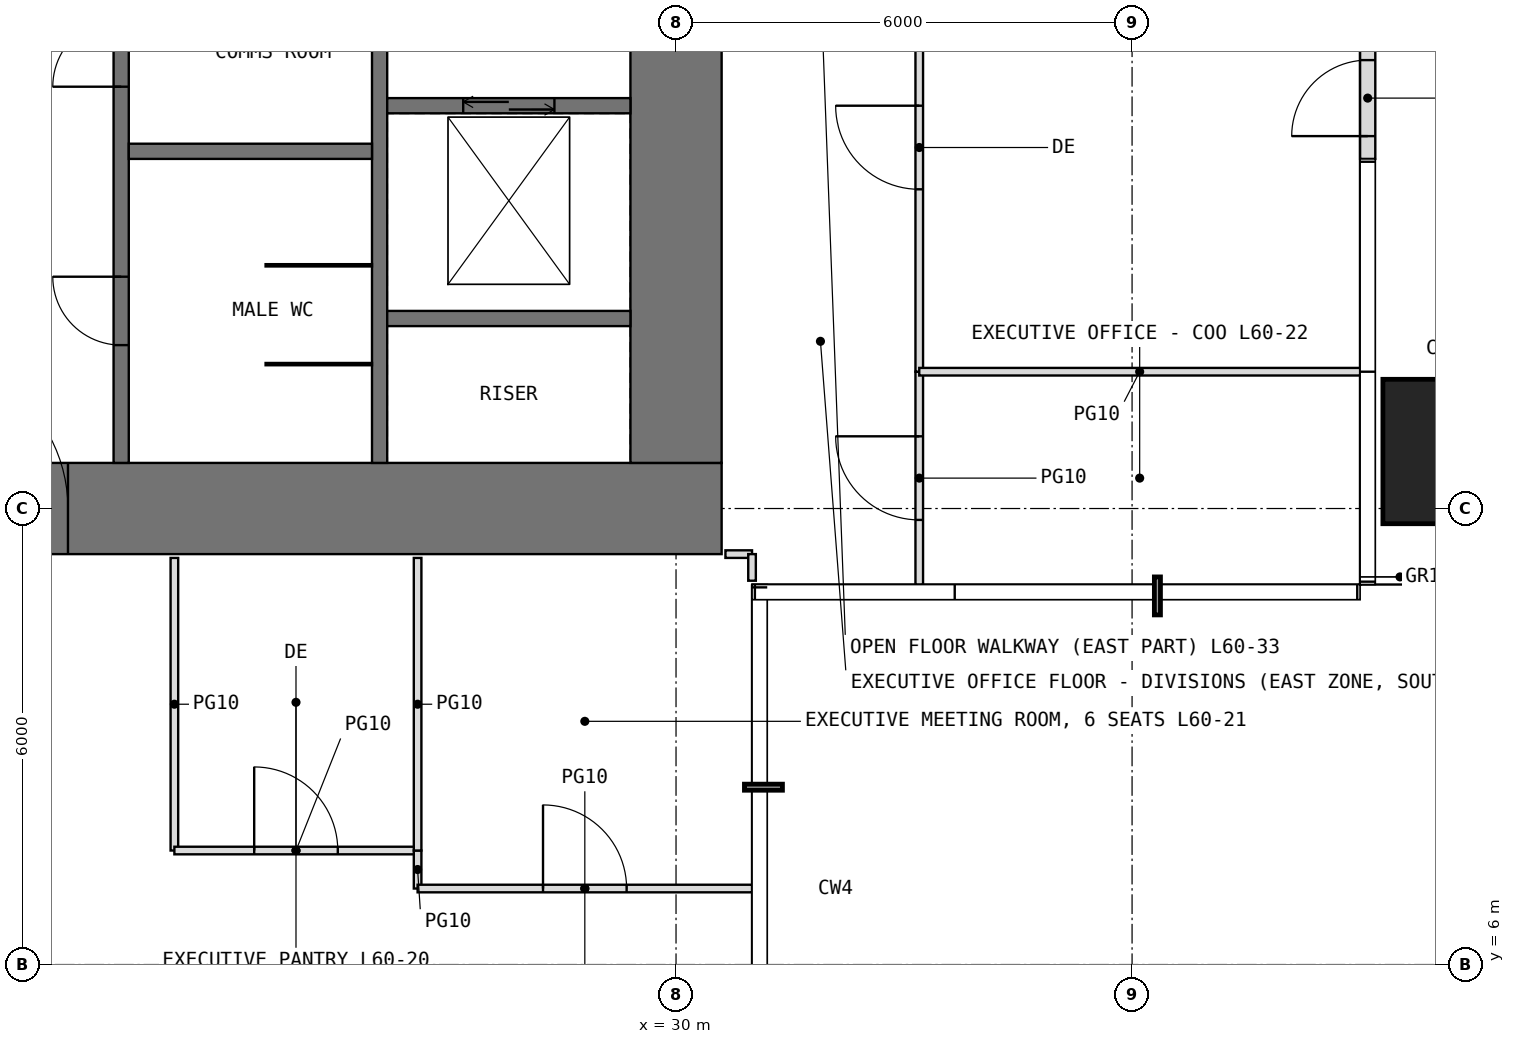
"""IFC4 building model, lengths in metres.
Left out: names, types, materials, properties, quantities, classifications, styles, units other than length and angle.
Written with IfcOpenShell. Run it as: python <this file> out.ifc"""

import sys

from ifc_helpers import new_model, si_unit, direction, frame, frame_2d, origin, origin_2d, place, context, subcontext, project, spatial, rectangle, extrude, element, fill, save


model = new_model("IFC4")
c1 = context("Model", 3, precision=1e-05, world=origin(), true_north=direction((0.0, 1.0)))
c2 = subcontext(c1, "Body", "Model", "MODEL_VIEW")
j1 = project(units=[si_unit("LENGTHUNIT", "METRE"), si_unit("PLANEANGLEUNIT", "RADIAN")], contexts=[c1])
p1 = place(None, origin())
s1 = spatial("IfcSite", under=j1, at=p1, CompositionType="ELEMENT")
p2 = place(p1, origin())
s2 = spatial("IfcBuilding", under=s1, at=p2, CompositionType="ELEMENT")
p3 = place(p2, frame((0.0, 0.0, 252.4)))
s3 = spatial("IfcBuildingStorey", under=s2, at=p3, CompositionType="ELEMENT", Elevation=252.4)
p4 = place(p3, frame((40.25, 12.75, 0.0), z_axis=(0.0, 0.0, 1.0), x_axis=(1.0, 0.0, 0.0)))
e1 = element("IfcColumn", 1, at=p4, inside=s3, PredefinedType="COLUMN", context=c2, shape_type="SweptSolid", body=[
    extrude(rectangle(XDim=1.9, YDim=1.9, at=origin_2d()), origin(), (0.0, 0.0, 1.0), 4.2),
])
p5 = place(p3, frame((39.1, 16.6, 0.0), z_axis=(0.0, 0.0, 1.0), x_axis=(0.0, 1.0, 0.0)))
e2 = element("IfcWall", 2, at=p5, inside=s3, PredefinedType="USERDEFINED", context=c2, shape_type="SweptSolid", body=[
    extrude(rectangle(XDim=4.05, YDim=0.2, at=frame_2d((2.025, 0.0))), origin(), (0.0, 0.0, 1.0), 3.95),
])
p6 = place(p5, frame((0.3, 0.0, 0.0)))
e3 = element("IfcOpeningElement", 3, at=p6, cuts=e2, PredefinedType="OPENING", context=c2, shape_type="SweptSolid", body=[
    extrude(rectangle(XDim=1.0, YDim=2.4, at=frame_2d((0.5, 1.2))), frame((0.0, 0.11, 0.0), z_axis=(0.0, -1.0, 0.0), x_axis=(1.0, 0.0, 0.0)), (0.0, 0.0, 1.0), 0.22),
])
p7 = place(p5, frame((1.6, 0.0, 0.3)))
e4 = element("IfcOpeningElement", 4, at=p7, cuts=e2, PredefinedType="OPENING", context=c2, shape_type="SweptSolid", body=[
    extrude(rectangle(XDim=2.0, YDim=2.7, at=frame_2d((1.0, 1.35))), frame((0.0, 0.11, 0.0), z_axis=(0.0, -1.0, 0.0), x_axis=(1.0, 0.0, 0.0)), (0.0, 0.0, 1.0), 0.22),
])
p8 = place(p3, frame((11.4, 12.0, -0.05), z_axis=(0.0, 0.0, 1.0), x_axis=(1.0, 0.0, 0.0)))
e5 = element("IfcWall", 5, at=p8, inside=s3, PredefinedType="SHEAR", context=c2, shape_type="SweptSolid", body=[
    extrude(rectangle(XDim=19.2, YDim=1.2, at=frame_2d((9.6, 0.0))), origin(), (0.0, 0.0, 1.0), 4.2),
])
p9 = place(p8, frame((8.6, 0.0, 0.05)))
e6 = element("IfcOpeningElement", 6, at=p9, cuts=e5, PredefinedType="OPENING", context=c2, shape_type="SweptSolid", body=[
    extrude(rectangle(XDim=2.0, YDim=2.2, at=frame_2d((1.0, 1.1))), frame((0.0, 0.61, 0.0), z_axis=(0.0, -1.0, 0.0), x_axis=(1.0, 0.0, 0.0)), (0.0, 0.0, 1.0), 1.22),
])
p10 = place(p3, frame((30.0, 12.6, -0.05), z_axis=(0.0, 0.0, 1.0), x_axis=(0.0, 1.0, 0.0)))
e7 = element("IfcWall", 7, at=p10, inside=s3, PredefinedType="SHEAR", context=c2, shape_type="SweptSolid", body=[
    extrude(rectangle(XDim=16.8, YDim=1.2, at=frame_2d((8.4, 0.0))), origin(), (0.0, 0.0, 1.0), 4.2),
])
p11 = place(p10, frame((5.9, 0.0, 0.05)))
e8 = element("IfcOpeningElement", 8, at=p11, cuts=e7, PredefinedType="OPENING", context=c2, shape_type="SweptSolid", body=[
    extrude(rectangle(XDim=1.0, YDim=2.2, at=frame_2d((0.5, 1.1))), frame((0.0, 0.61, 0.0), z_axis=(0.0, -1.0, 0.0), x_axis=(1.0, 0.0, 0.0)), (0.0, 0.0, 1.0), 1.22),
])
p12 = place(p3, frame((22.7, 12.6, -0.05), z_axis=(0.0, 0.0, 1.0), x_axis=(0.0, 1.0, 0.0)))
e9 = element("IfcWall", 9, at=p12, inside=s3, PredefinedType="SHEAR", context=c2, shape_type="SweptSolid", body=[
    extrude(rectangle(XDim=16.8, YDim=0.2, at=frame_2d((8.4, 0.0))), origin(), (0.0, 0.0, 1.0), 4.2),
])
p13 = place(p12, frame((7.1, 0.0, 0.05)))
e10 = element("IfcOpeningElement", 10, at=p13, cuts=e9, PredefinedType="OPENING", context=c2, shape_type="SweptSolid", body=[
    extrude(rectangle(XDim=1.0, YDim=2.2, at=frame_2d((0.5, 1.1))), frame((0.0, 0.11, 0.0), z_axis=(0.0, -1.0, 0.0), x_axis=(1.0, 0.0, 0.0)), (0.0, 0.0, 1.0), 0.22),
])
p14 = place(p12, frame((1.55, 0.0, 0.05)))
e11 = element("IfcOpeningElement", 11, at=p14, cuts=e9, PredefinedType="OPENING", context=c2, shape_type="SweptSolid", body=[
    extrude(rectangle(XDim=0.9, YDim=2.2, at=frame_2d((0.45, 1.1))), frame((0.0, 0.11, 0.0), z_axis=(0.0, -1.0, 0.0), x_axis=(1.0, 0.0, 0.0)), (0.0, 0.0, 1.0), 0.22),
])
p15 = place(p12, frame((4.95, 0.0, 0.05)))
e12 = element("IfcOpeningElement", 12, at=p15, cuts=e9, PredefinedType="OPENING", context=c2, shape_type="SweptSolid", body=[
    extrude(rectangle(XDim=0.9, YDim=2.2, at=frame_2d((0.45, 1.1))), frame((0.0, 0.11, 0.0), z_axis=(0.0, -1.0, 0.0), x_axis=(1.0, 0.0, 0.0)), (0.0, 0.0, 1.0), 0.22),
])
p16 = place(p12, frame((9.4, 0.0, 0.05)))
e13 = element("IfcOpeningElement", 13, at=p16, cuts=e9, PredefinedType="OPENING", context=c2, shape_type="SweptSolid", body=[
    extrude(rectangle(XDim=1.0, YDim=2.2, at=frame_2d((0.5, 1.1))), frame((0.0, 0.11, 0.0), z_axis=(0.0, -1.0, 0.0), x_axis=(1.0, 0.0, 0.0)), (0.0, 0.0, 1.0), 0.22),
])
p17 = place(p12, frame((12.2, 0.0, 0.05)))
e14 = element("IfcOpeningElement", 14, at=p17, cuts=e9, PredefinedType="OPENING", context=c2, shape_type="SweptSolid", body=[
    extrude(rectangle(XDim=1.0, YDim=2.2, at=frame_2d((0.5, 1.1))), frame((0.0, 0.11, 0.0), z_axis=(0.0, -1.0, 0.0), x_axis=(1.0, 0.0, 0.0)), (0.0, 0.0, 1.0), 0.22),
])
p18 = place(p12, frame((15.0, 0.0, 0.05)))
e15 = element("IfcOpeningElement", 15, at=p18, cuts=e9, PredefinedType="OPENING", context=c2, shape_type="SweptSolid", body=[
    extrude(rectangle(XDim=1.0, YDim=2.2, at=frame_2d((0.5, 1.1))), frame((0.0, 0.11, 0.0), z_axis=(0.0, -1.0, 0.0), x_axis=(1.0, 0.0, 0.0)), (0.0, 0.0, 1.0), 0.22),
])
p19 = place(p3, frame((26.1, 12.6, -0.05), z_axis=(0.0, 0.0, 1.0), x_axis=(0.0, 1.0, 0.0)))
e16 = element("IfcWall", 16, at=p19, inside=s3, PredefinedType="SHEAR", context=c2, shape_type="SweptSolid", body=[
    extrude(rectangle(XDim=16.8, YDim=0.2, at=frame_2d((8.4, 0.0))), origin(), (0.0, 0.0, 1.0), 4.2),
])
p20 = place(p19, frame((6.9, 0.0, 0.05)))
e17 = element("IfcOpeningElement", 17, at=p20, cuts=e16, PredefinedType="OPENING", context=c2, shape_type="SweptSolid", body=[
    extrude(rectangle(XDim=1.0, YDim=2.2, at=frame_2d((0.5, 1.1))), frame((0.0, 0.11, 0.0), z_axis=(0.0, -1.0, 0.0), x_axis=(1.0, 0.0, 0.0)), (0.0, 0.0, 1.0), 0.22),
])
for number, where, z_axis, x_axis in (
    (18, (22.8, 16.7, -0.05), (0.0, 0.0, 1.0), (1.0, 0.0, 0.0)),
    (19, (26.2, 14.5, -0.05), (0.0, 0.0, 1.0), (1.0, 0.0, 0.0)),
):
    element("IfcWall", number, at=place(p3, frame(where, z_axis=z_axis, x_axis=x_axis)), inside=s3, PredefinedType="SHEAR", context=c2, shape_type="SweptSolid", body=[
        extrude(rectangle(XDim=3.2, YDim=0.2, at=frame_2d((1.6, 0.0))), origin(), (0.0, 0.0, 1.0), 4.2),
    ])
p21 = place(p3, frame((26.2, 17.3, -0.05), z_axis=(0.0, 0.0, 1.0), x_axis=(1.0, 0.0, 0.0)))
e20 = element("IfcWall", 20, at=p21, inside=s3, PredefinedType="SHEAR", context=c2, shape_type="SweptSolid", body=[
    extrude(rectangle(XDim=3.2, YDim=0.2, at=frame_2d((1.6, 0.0))), origin(), (0.0, 0.0, 1.0), 4.2),
])
p22 = place(p21, frame((1.0, 0.0, 0.05)))
e21 = element("IfcOpeningElement", 21, at=p22, cuts=e20, PredefinedType="OPENING", context=c2, shape_type="SweptSolid", body=[
    extrude(rectangle(XDim=1.2, YDim=2.2, at=frame_2d((0.6, 1.1))), frame((0.0, 0.11, 0.0), z_axis=(0.0, -1.0, 0.0), x_axis=(1.0, 0.0, 0.0)), (0.0, 0.0, 1.0), 0.22),
])
for number, where, z_axis, x_axis in (
    (22, (24.6, 13.9, 0.0), (0.0, 0.0, 1.0), (1.0, 0.0, 0.0)),
    (23, (24.6, 15.2, 0.0), (0.0, 0.0, 1.0), (1.0, 0.0, 0.0)),
):
    element("IfcWall", number, at=place(p3, frame(where, z_axis=z_axis, x_axis=x_axis)), inside=s3, PredefinedType="PARTITIONING", context=c2, shape_type="SweptSolid", body=[
        extrude(rectangle(XDim=1.4, YDim=0.03, at=frame_2d((0.7, 0.0))), origin(), (0.0, 0.0, 1.0), 3.95),
    ])
p23 = place(p3, frame((23.4, 7.5, 0.0), z_axis=(0.0, 0.0, 1.0), x_axis=(0.0, 1.0, 0.0)))
e24 = element("IfcWall", 24, at=p23, inside=s3, PredefinedType="PARTITIONING", context=c2, shape_type="SweptSolid", body=[
    extrude(rectangle(XDim=3.85, YDim=0.1, at=frame_2d((1.925, 0.0))), origin(), (0.0, 0.0, 1.0), 3.95),
])
p24 = place(p3, frame((23.4, 7.5, 0.0), z_axis=(0.0, 0.0, 1.0), x_axis=(1.0, 0.0, 0.0)))
e25 = element("IfcWall", 25, at=p24, inside=s3, PredefinedType="PARTITIONING", context=c2, shape_type="SweptSolid", body=[
    extrude(rectangle(XDim=3.2, YDim=0.1, at=frame_2d((1.6, 0.0))), origin(), (0.0, 0.0, 1.0), 3.95),
])
p25 = place(p24, frame((1.05, 0.0, 0.0)))
e26 = element("IfcOpeningElement", 26, at=p25, cuts=e25, PredefinedType="OPENING", context=c2, shape_type="SweptSolid", body=[
    extrude(rectangle(XDim=1.1, YDim=2.3, at=frame_2d((0.55, 1.15))), frame((0.0, 0.06, 0.0), z_axis=(0.0, -1.0, 0.0), x_axis=(1.0, 0.0, 0.0)), (0.0, 0.0, 1.0), 0.12),
])
p26 = place(p3, frame((26.6, 7.0, 0.0), z_axis=(0.0, 0.0, 1.0), x_axis=(0.0, 1.0, 0.0)))
e27 = element("IfcWall", 27, at=p26, inside=s3, PredefinedType="PARTITIONING", context=c2, shape_type="SweptSolid", body=[
    extrude(rectangle(XDim=0.5, YDim=0.1, at=frame_2d((0.25, 0.0))), origin(), (0.0, 0.0, 1.0), 3.95),
])
p27 = place(p3, frame((26.6, 7.0, 0.0), z_axis=(0.0, 0.0, 1.0), x_axis=(1.0, 0.0, 0.0)))
e28 = element("IfcWall", 28, at=p27, inside=s3, PredefinedType="PARTITIONING", context=c2, shape_type="SweptSolid", body=[
    extrude(rectangle(XDim=4.4, YDim=0.1, at=frame_2d((2.2, 0.0))), origin(), (0.0, 0.0, 1.0), 3.95),
])
p28 = place(p27, frame((1.65, 0.0, 0.0)))
e29 = element("IfcOpeningElement", 29, at=p28, cuts=e28, PredefinedType="OPENING", context=c2, shape_type="SweptSolid", body=[
    extrude(rectangle(XDim=1.1, YDim=2.3, at=frame_2d((0.55, 1.15))), frame((0.0, 0.06, 0.0), z_axis=(0.0, -1.0, 0.0), x_axis=(1.0, 0.0, 0.0)), (0.0, 0.0, 1.0), 0.12),
])
p29 = place(p3, frame((26.6, 7.5, 0.0), z_axis=(0.0, 0.0, 1.0), x_axis=(0.0, 1.0, 0.0)))
e30 = element("IfcWall", 30, at=p29, inside=s3, PredefinedType="PARTITIONING", context=c2, shape_type="SweptSolid", body=[
    extrude(rectangle(XDim=3.85, YDim=0.1, at=frame_2d((1.925, 0.0))), origin(), (0.0, 0.0, 1.0), 3.95),
])
p30 = place(p3, frame((30.65, 11.4, 0.0), z_axis=(0.0, 0.0, 1.0), x_axis=(1.0, 0.0, 0.0)))
e31 = element("IfcWall", 31, at=p30, inside=s3, PredefinedType="PARTITIONING", context=c2, shape_type="SweptSolid", body=[
    extrude(rectangle(XDim=0.35, YDim=0.1, at=frame_2d((0.175, 0.0))), origin(), (0.0, 0.0, 1.0), 3.95),
])
p31 = place(p3, frame((31.0, 11.05, 0.0), z_axis=(0.0, 0.0, 1.0), x_axis=(0.0, 1.0, 0.0)))
e32 = element("IfcWall", 32, at=p31, inside=s3, PredefinedType="PARTITIONING", context=c2, shape_type="SweptSolid", body=[
    extrude(rectangle(XDim=0.35, YDim=0.1, at=frame_2d((0.175, 0.0))), origin(), (0.0, 0.0, 1.0), 3.95),
])
p32 = place(p3, frame((33.2, 11.0, 0.0), z_axis=(0.0, 0.0, 1.0), x_axis=(0.0, 1.0, 0.0)))
e33 = element("IfcWall", 33, at=p32, inside=s3, PredefinedType="PARTITIONING", context=c2, shape_type="SweptSolid", body=[
    extrude(rectangle(XDim=2.8, YDim=0.1, at=frame_2d((1.4, 0.0))), origin(), (0.0, 0.0, 1.0), 3.95),
])
p33 = place(p32, frame((0.85, 0.0, 0.0)))
e34 = element("IfcOpeningElement", 34, at=p33, cuts=e33, PredefinedType="OPENING", context=c2, shape_type="SweptSolid", body=[
    extrude(rectangle(XDim=1.1, YDim=2.3, at=frame_2d((0.55, 1.15))), frame((0.0, 0.06, 0.0), z_axis=(0.0, -1.0, 0.0), x_axis=(1.0, 0.0, 0.0)), (0.0, 0.0, 1.0), 0.12),
])
p34 = place(p3, frame((33.2, 13.8, 0.0), z_axis=(0.0, 0.0, 1.0), x_axis=(0.0, 1.0, 0.0)))
e35 = element("IfcWall", 35, at=p34, inside=s3, PredefinedType="PARTITIONING", context=c2, shape_type="SweptSolid", body=[
    extrude(rectangle(XDim=10.3, YDim=0.1, at=frame_2d((5.15, 0.0))), origin(), (0.0, 0.0, 1.0), 3.95),
])
p35 = place(p34, frame((2.4, 0.0, 0.0)))
e36 = element("IfcOpeningElement", 36, at=p35, cuts=e35, PredefinedType="OPENING", context=c2, shape_type="SweptSolid", body=[
    extrude(rectangle(XDim=1.1, YDim=2.3, at=frame_2d((0.55, 1.15))), frame((0.0, 0.06, 0.0), z_axis=(0.0, -1.0, 0.0), x_axis=(1.0, 0.0, 0.0)), (0.0, 0.0, 1.0), 0.12),
])
p36 = place(p3, frame((33.2, 13.8, 0.0), z_axis=(0.0, 0.0, 1.0), x_axis=(1.0, 0.0, 0.0)))
e37 = element("IfcWall", 37, at=p36, inside=s3, PredefinedType="PARTITIONING", context=c2, shape_type="SweptSolid", body=[
    extrude(rectangle(XDim=5.8, YDim=0.1, at=frame_2d((2.9, 0.0))), origin(), (0.0, 0.0, 1.0), 3.95),
])
p37 = place(p6, origin())
e38 = element("IfcDoor", 38, at=p37, inside=s3, OperationType="SINGLE_SWING_LEFT", PredefinedType="DOOR", context=c2, shape_type="SweptSolid", body=[
    extrude(rectangle(XDim=1.0, YDim=2.4, at=frame_2d((0.5, 1.2))), frame((0.0, 0.025, 0.0), z_axis=(0.0, -1.0, 0.0), x_axis=(1.0, 0.0, 0.0)), (0.0, 0.0, 1.0), 0.05),
])
fill(e3, e38)
p38 = place(p9, origin())
e39 = element("IfcDoor", 39, at=p38, inside=s3, OperationType="DOUBLE_DOOR_SINGLE_SWING", PredefinedType="DOOR", context=c2, shape_type="SweptSolid", body=[
    extrude(rectangle(XDim=2.0, YDim=2.2, at=frame_2d((1.0, 1.1))), frame((0.0, 0.025, 0.0), z_axis=(0.0, -1.0, 0.0), x_axis=(1.0, 0.0, 0.0)), (0.0, 0.0, 1.0), 0.05),
])
fill(e6, e39)
p39 = place(p14, origin())
e40 = element("IfcDoor", 40, at=p39, inside=s3, OperationType="SINGLE_SWING_RIGHT", PredefinedType="DOOR", context=c2, shape_type="SweptSolid", body=[
    extrude(rectangle(XDim=0.9, YDim=2.2, at=frame_2d((0.45, 1.1))), frame((0.0, 0.025, 0.0), z_axis=(0.0, -1.0, 0.0), x_axis=(1.0, 0.0, 0.0)), (0.0, 0.0, 1.0), 0.05),
])
fill(e11, e40)
p40 = place(p15, origin())
e41 = element("IfcDoor", 41, at=p40, inside=s3, OperationType="SINGLE_SWING_LEFT", PredefinedType="DOOR", context=c2, shape_type="SweptSolid", body=[
    extrude(rectangle(XDim=0.9, YDim=2.2, at=frame_2d((0.45, 1.1))), frame((0.0, 0.025, 0.0), z_axis=(0.0, -1.0, 0.0), x_axis=(1.0, 0.0, 0.0)), (0.0, 0.0, 1.0), 0.05),
])
fill(e12, e41)
p41 = place(p25, origin())
e42 = element("IfcDoor", 42, at=p41, inside=s3, OperationType="SINGLE_SWING_LEFT", PredefinedType="DOOR", context=c2, shape_type="SweptSolid", body=[
    extrude(rectangle(XDim=1.1, YDim=2.3, at=frame_2d((0.55, 1.15))), frame((0.0, 0.025, 0.0), z_axis=(0.0, -1.0, 0.0), x_axis=(1.0, 0.0, 0.0)), (0.0, 0.0, 1.0), 0.05),
])
fill(e26, e42)
p42 = place(p28, origin())
e43 = element("IfcDoor", 43, at=p42, inside=s3, OperationType="SINGLE_SWING_LEFT", PredefinedType="DOOR", context=c2, shape_type="SweptSolid", body=[
    extrude(rectangle(XDim=1.1, YDim=2.3, at=frame_2d((0.55, 1.15))), frame((0.0, 0.025, 0.0), z_axis=(0.0, -1.0, 0.0), x_axis=(1.0, 0.0, 0.0)), (0.0, 0.0, 1.0), 0.05),
])
fill(e29, e43)
p43 = place(p33, origin())
e44 = element("IfcDoor", 44, at=p43, inside=s3, OperationType="SINGLE_SWING_RIGHT", PredefinedType="DOOR", context=c2, shape_type="SweptSolid", body=[
    extrude(rectangle(XDim=1.1, YDim=2.3, at=frame_2d((0.55, 1.15))), frame((0.0, 0.025, 0.0), z_axis=(0.0, -1.0, 0.0), x_axis=(1.0, 0.0, 0.0)), (0.0, 0.0, 1.0), 0.05),
])
fill(e34, e44)
p44 = place(p35, origin())
e45 = element("IfcDoor", 45, at=p44, inside=s3, OperationType="SINGLE_SWING_RIGHT", PredefinedType="DOOR", context=c2, shape_type="SweptSolid", body=[
    extrude(rectangle(XDim=1.1, YDim=2.3, at=frame_2d((0.55, 1.15))), frame((0.0, 0.025, 0.0), z_axis=(0.0, -1.0, 0.0), x_axis=(1.0, 0.0, 0.0)), (0.0, 0.0, 1.0), 0.05),
])
fill(e36, e45)
p45 = place(p22, origin())
e46 = element("IfcDoor", 46, at=p45, inside=s3, OperationType="DOUBLE_DOOR_SLIDING", PredefinedType="DOOR", context=c2, shape_type="SweptSolid", body=[
    extrude(rectangle(XDim=1.2, YDim=2.2, at=frame_2d((0.6, 1.1))), frame((0.0, 0.025, 0.0), z_axis=(0.0, -1.0, 0.0), x_axis=(1.0, 0.0, 0.0)), (0.0, 0.0, 1.0), 0.05),
])
fill(e21, e46)
save(model, sys.argv[1])
